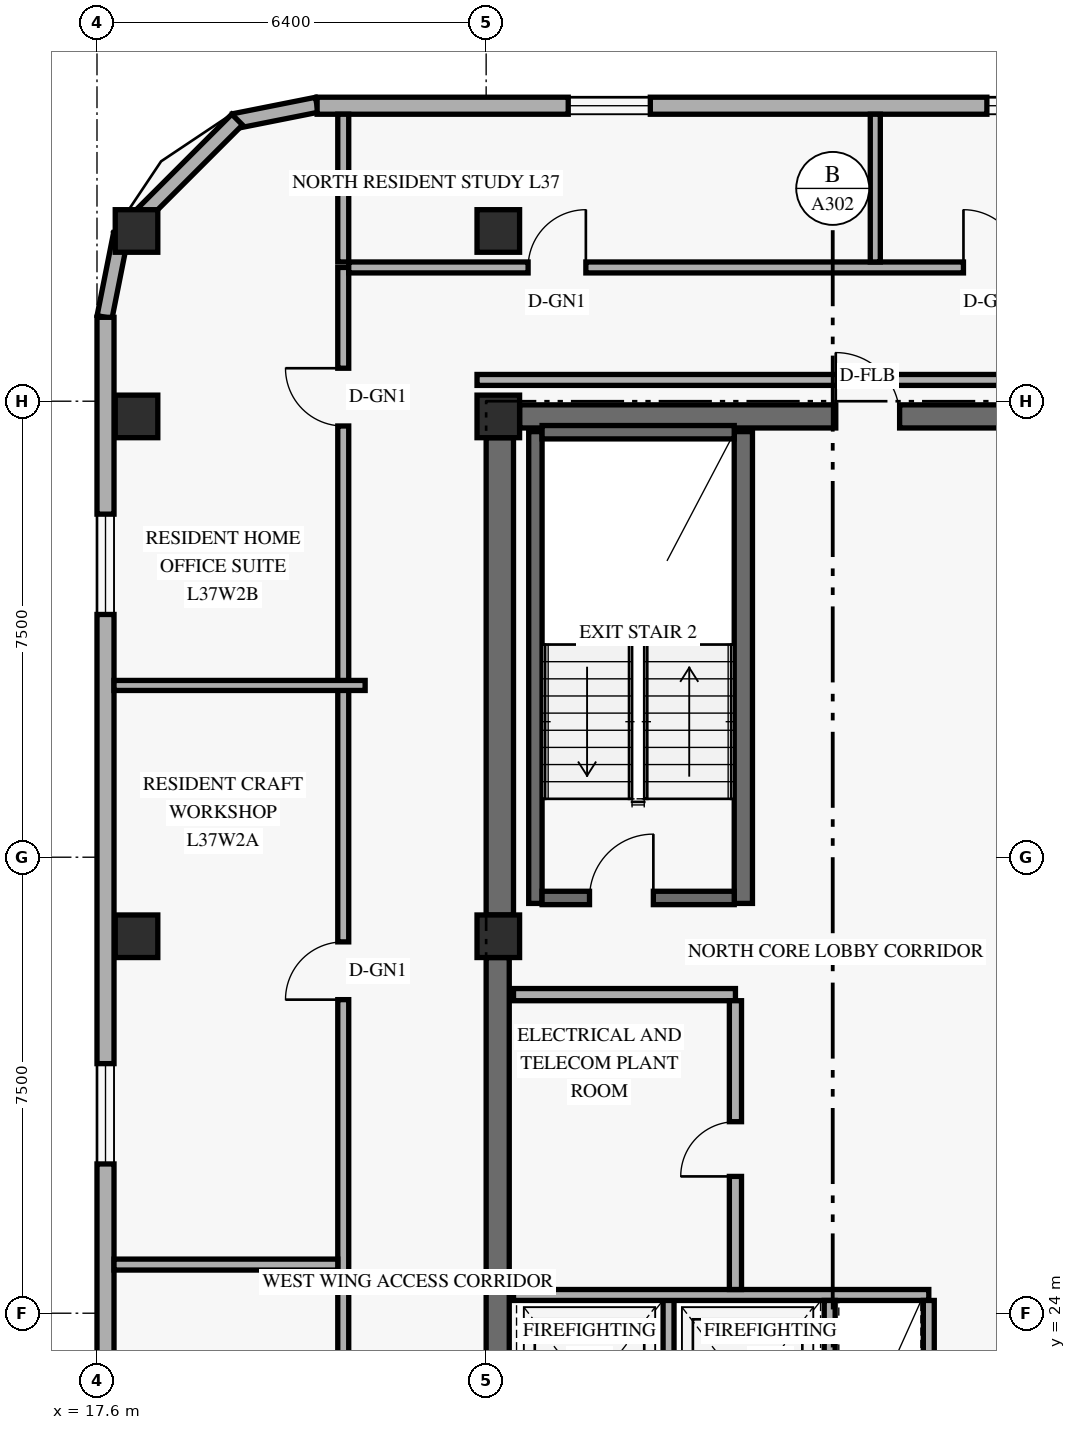
"""IFC4 building model, lengths in metres.
Left out: names, types, materials, properties, quantities, classifications, styles, units other than length and angle.
Written with IfcOpenShell. Run it as: python <this file> out.ifc"""

import sys

from ifc_helpers import new_model, si_unit, direction, frame, frame_2d, origin, origin_2d, place, context, subcontext, project, spatial, rectangle, extrude, element, fill, save


model = new_model("IFC4")
c1 = context("Model", 3, precision=1e-05, world=origin(), true_north=direction((0.0, 1.0)))
c2 = subcontext(c1, "Body", "Model", "MODEL_VIEW")
j1 = project(units=[si_unit("LENGTHUNIT", "METRE"), si_unit("PLANEANGLEUNIT", "RADIAN")], contexts=[c1])
p1 = place(None, origin())
s1 = spatial("IfcSite", under=j1, at=p1, CompositionType="ELEMENT")
p2 = place(p1, origin())
s2 = spatial("IfcBuilding", under=s1, at=p2, CompositionType="ELEMENT")
p3 = place(p2, frame((0.0, 0.0, 144.6)))
s3 = spatial("IfcBuildingStorey", under=s2, at=p3, CompositionType="ELEMENT", Elevation=144.6)
p4 = place(p3, frame((24.19, 17.9, 0.0), z_axis=(0.0, 0.0, 1.0), x_axis=(0.0, 1.0, 0.0)))
e1 = element("IfcWall", 1, at=p4, inside=s3, PredefinedType="SHEAR", context=c2, shape_type="SweptSolid", body=[
    extrude(rectangle(XDim=11.95, YDim=0.38, at=frame_2d((5.975, 0.0))), origin(), (0.0, 0.0, 1.0), 2.748),
])
p5 = place(p3, frame((24.225, 30.55, 0.0), z_axis=(0.0, 0.0, 1.0), x_axis=(0.0, 1.0, 0.0)))
e2 = element("IfcWall", 2, at=p5, inside=s3, PredefinedType="SHEAR", context=c2, shape_type="SweptSolid", body=[
    extrude(rectangle(XDim=7.85, YDim=0.45, at=frame_2d((3.925, 0.0))), origin(), (0.0, 0.0, 1.0), 2.748),
])
p6 = place(p3, frame((24.55, 38.75, 0.0), z_axis=(0.0, 0.0, 1.0), x_axis=(1.0, 0.0, 0.0)))
e3 = element("IfcWall", 3, at=p6, inside=s3, PredefinedType="SHEAR", context=c2, shape_type="SweptSolid", body=[
    extrude(rectangle(XDim=10.3, YDim=0.38, at=frame_2d((5.15, 0.0))), origin(), (0.0, 0.0, 1.0), 3.36),
])
p7 = place(p6, frame((5.2, 0.0, 0.0)))
e4 = element("IfcOpeningElement", 4, at=p7, cuts=e3, PredefinedType="OPENING", context=c2, shape_type="SweptSolid", body=[
    extrude(rectangle(XDim=1.05, YDim=2.15, at=frame_2d((0.525, 1.075))), frame((0.0, 0.2, 0.0), z_axis=(0.0, -1.0, 0.0), x_axis=(1.0, 0.0, 0.0)), (0.0, 0.0, 1.0), 0.4),
])
p8 = place(p3, frame((24.81, 30.74, 0.0), z_axis=(0.0, 0.0, 1.0), x_axis=(0.0, 1.0, 0.0)))
e5 = element("IfcWall", 5, at=p8, inside=s3, PredefinedType="SHEAR", context=c2, shape_type="SweptSolid", body=[
    extrude(rectangle(XDim=7.76, YDim=0.22, at=frame_2d((3.88, 0.0))), origin(), (0.0, 0.0, 1.0), 3.36),
])
p9 = place(p3, frame((28.23, 30.74, 0.0), z_axis=(0.0, 0.0, 1.0), x_axis=(0.0, 1.0, 0.0)))
e6 = element("IfcWall", 6, at=p9, inside=s3, PredefinedType="SHEAR", context=c2, shape_type="SweptSolid", body=[
    extrude(rectangle(XDim=7.76, YDim=0.3, at=frame_2d((3.88, 0.0))), origin(), (0.0, 0.0, 1.0), 3.36),
])
p10 = place(p3, frame((24.92, 30.83, 0.0), z_axis=(0.0, 0.0, 1.0), x_axis=(1.0, 0.0, 0.0)))
e7 = element("IfcWall", 7, at=p10, inside=s3, PredefinedType="SHEAR", context=c2, shape_type="SweptSolid", body=[
    extrude(rectangle(XDim=3.16, YDim=0.22, at=frame_2d((1.58, 0.0))), origin(), (0.0, 0.0, 1.0), 3.36),
])
p11 = place(p10, frame((0.78, 0.0, 0.0)))
e8 = element("IfcOpeningElement", 8, at=p11, cuts=e7, PredefinedType="OPENING", context=c2, shape_type="SweptSolid", body=[
    extrude(rectangle(XDim=1.05, YDim=2.15, at=frame_2d((0.525, 1.075))), frame((0.0, 0.12, 0.0), z_axis=(0.0, -1.0, 0.0), x_axis=(1.0, 0.0, 0.0)), (0.0, 0.0, 1.0), 0.24),
])
p12 = place(p3, frame((24.92, 38.49, 0.0), z_axis=(0.0, 0.0, 1.0), x_axis=(1.0, 0.0, 0.0)))
e9 = element("IfcWall", 9, at=p12, inside=s3, PredefinedType="SHEAR", context=c2, shape_type="SweptSolid", body=[
    extrude(rectangle(XDim=3.16, YDim=0.22, at=frame_2d((1.58, 0.0))), origin(), (0.0, 0.0, 1.0), 3.36),
])
for number, where, z_axis, x_axis in (
    (10, (18.25, 30.2, 0.0), (0.0, 0.0, 1.0), (1.0, 0.0, 0.0)),
    (11, (18.25, 38.75, 0.0), (0.0, 0.0, 1.0), (1.0, 0.0, 0.0)),
    (12, (18.25, 41.8, 0.0), (0.0, 0.0, 1.0), (1.0, 0.0, 0.0)),
    (13, (24.2, 30.2, 0.0), (0.0, 0.0, 1.0), (1.0, 0.0, 0.0)),
    (14, (24.2, 38.75, 0.0), (0.0, 0.0, 1.0), (1.0, 0.0, 0.0)),
    (15, (24.2, 41.8, 0.0), (0.0, 0.0, 1.0), (1.0, 0.0, 0.0)),
):
    element("IfcColumn", number, at=place(p3, frame(where, z_axis=z_axis, x_axis=x_axis)), inside=s3, PredefinedType="COLUMN", context=c2, shape_type="SweptSolid", body=[
        extrude(rectangle(XDim=0.7, YDim=0.7, at=origin_2d()), origin(), (0.0, 0.0, 1.0), 3.6),
    ])
p13 = place(p3, frame((21.217, 43.876, 0.0), z_axis=(0.0, 0.0, 1.0), x_axis=(-0.980809899341, -0.19496651342, 0.0)))
e16 = element("IfcWall", 16, at=p13, inside=s3, PredefinedType="SOLIDWALL", context=c2, shape_type="SweptSolid", body=[
    extrude(rectangle(XDim=1.389, YDim=0.25, at=frame_2d((0.694, 0.0))), origin(), (0.0, 0.0, 1.0), 3.36),
])
p14 = place(p3, frame((19.905, 43.632, 0.0), z_axis=(0.0, 0.0, 1.0), x_axis=(-0.707106781187, -0.707106781187, 0.0)))
e17 = element("IfcWall", 17, at=p14, inside=s3, PredefinedType="SOLIDWALL", context=c2, shape_type="SweptSolid", body=[
    extrude(rectangle(XDim=2.739, YDim=0.25, at=frame_2d((1.37, 0.0))), origin(), (0.0, 0.0, 1.0), 3.36),
])
p15 = place(p3, frame((17.995, 41.746, 0.0), z_axis=(0.0, 0.0, 1.0), x_axis=(-0.195135625965, -0.9807762678, 0.0)))
e18 = element("IfcWall", 18, at=p15, inside=s3, PredefinedType="SOLIDWALL", context=c2, shape_type="SweptSolid", body=[
    extrude(rectangle(XDim=1.389, YDim=0.25, at=frame_2d((0.694, 0.0))), origin(), (0.0, 0.0, 1.0), 3.36),
])
p16 = place(p3, frame((54.98, 43.86, 0.0), z_axis=(0.0, 0.0, 1.0), x_axis=(-1.0, 0.0, 0.0)))
e19 = element("IfcWall", 19, at=p16, inside=s3, PredefinedType="SOLIDWALL", context=c2, shape_type="SweptSolid", body=[
    extrude(rectangle(XDim=33.76, YDim=0.28, at=frame_2d((16.88, 0.0))), origin(), (0.0, 0.0, 1.0), 3.36),
])
p17 = place(p16, frame((28.28, 0.0, 0.85)))
e20 = element("IfcOpeningElement", 20, at=p17, cuts=e19, PredefinedType="OPENING", context=c2, shape_type="SweptSolid", body=[
    extrude(rectangle(XDim=1.35, YDim=1.55, at=frame_2d((0.675, 0.775))), frame((0.0, 0.15, 0.0), z_axis=(0.0, -1.0, 0.0), x_axis=(1.0, 0.0, 0.0)), (0.0, 0.0, 1.0), 0.3),
])
p18 = place(p16, frame((21.395, 0.0, 0.85)))
e21 = element("IfcOpeningElement", 21, at=p18, cuts=e19, PredefinedType="OPENING", context=c2, shape_type="SweptSolid", body=[
    extrude(rectangle(XDim=1.35, YDim=1.55, at=frame_2d((0.675, 0.775))), frame((0.0, 0.15, 0.0), z_axis=(0.0, -1.0, 0.0), x_axis=(1.0, 0.0, 0.0)), (0.0, 0.0, 1.0), 0.3),
])
p19 = place(p16, frame((15.09, 0.0, 0.85)))
e22 = element("IfcOpeningElement", 22, at=p19, cuts=e19, PredefinedType="OPENING", context=c2, shape_type="SweptSolid", body=[
    extrude(rectangle(XDim=1.35, YDim=1.55, at=frame_2d((0.675, 0.775))), frame((0.0, 0.15, 0.0), z_axis=(0.0, -1.0, 0.0), x_axis=(1.0, 0.0, 0.0)), (0.0, 0.0, 1.0), 0.3),
])
p20 = place(p16, frame((8.8, 0.0, 0.85)))
e23 = element("IfcOpeningElement", 23, at=p20, cuts=e19, PredefinedType="OPENING", context=c2, shape_type="SweptSolid", body=[
    extrude(rectangle(XDim=1.35, YDim=1.55, at=frame_2d((0.675, 0.775))), frame((0.0, 0.15, 0.0), z_axis=(0.0, -1.0, 0.0), x_axis=(1.0, 0.0, 0.0)), (0.0, 0.0, 1.0), 0.3),
])
p21 = place(p16, frame((5.48, 0.0, 0.85)))
e24 = element("IfcOpeningElement", 24, at=p21, cuts=e19, PredefinedType="OPENING", context=c2, shape_type="SweptSolid", body=[
    extrude(rectangle(XDim=1.2, YDim=1.5, at=frame_2d((0.6, 0.75))), frame((0.0, 0.15, 0.0), z_axis=(0.0, -1.0, 0.0), x_axis=(1.0, 0.0, 0.0)), (0.0, 0.0, 1.0), 0.3),
])
p22 = place(p16, frame((1.915, 0.0, 0.85)))
e25 = element("IfcOpeningElement", 25, at=p22, cuts=e19, PredefinedType="OPENING", context=c2, shape_type="SweptSolid", body=[
    extrude(rectangle(XDim=1.35, YDim=1.55, at=frame_2d((0.675, 0.775))), frame((0.0, 0.15, 0.0), z_axis=(0.0, -1.0, 0.0), x_axis=(1.0, 0.0, 0.0)), (0.0, 0.0, 1.0), 0.3),
])
p23 = place(p3, frame((17.74, 40.38, 0.0), z_axis=(0.0, 0.0, 1.0), x_axis=(0.0, -1.0, 0.0)))
e26 = element("IfcWall", 26, at=p23, inside=s3, PredefinedType="SOLIDWALL", context=c2, shape_type="SweptSolid", body=[
    extrude(rectangle(XDim=32.76, YDim=0.28, at=frame_2d((16.38, 0.0))), origin(), (0.0, 0.0, 1.0), 3.36),
])
p24 = place(p23, frame((27.698, 0.0, 0.85)))
e27 = element("IfcOpeningElement", 27, at=p24, cuts=e26, PredefinedType="OPENING", context=c2, shape_type="SweptSolid", body=[
    extrude(rectangle(XDim=1.65, YDim=1.6, at=frame_2d((0.825, 0.8))), frame((0.0, 0.15, 0.0), z_axis=(0.0, -1.0, 0.0), x_axis=(1.0, 0.0, 0.0)), (0.0, 0.0, 1.0), 0.3),
])
p25 = place(p23, frame((18.16, 0.0, 0.85)))
e28 = element("IfcOpeningElement", 28, at=p25, cuts=e26, PredefinedType="OPENING", context=c2, shape_type="SweptSolid", body=[
    extrude(rectangle(XDim=1.65, YDim=1.6, at=frame_2d((0.825, 0.8))), frame((0.0, 0.15, 0.0), z_axis=(0.0, -1.0, 0.0), x_axis=(1.0, 0.0, 0.0)), (0.0, 0.0, 1.0), 0.3),
])
p26 = place(p23, frame((12.275, 0.0, 0.85)))
e29 = element("IfcOpeningElement", 29, at=p26, cuts=e26, PredefinedType="OPENING", context=c2, shape_type="SweptSolid", body=[
    extrude(rectangle(XDim=1.65, YDim=1.6, at=frame_2d((0.825, 0.8))), frame((0.0, 0.15, 0.0), z_axis=(0.0, -1.0, 0.0), x_axis=(1.0, 0.0, 0.0)), (0.0, 0.0, 1.0), 0.3),
])
p27 = place(p23, frame((3.238, 0.0, 0.85)))
e30 = element("IfcOpeningElement", 30, at=p27, cuts=e26, PredefinedType="OPENING", context=c2, shape_type="SweptSolid", body=[
    extrude(rectangle(XDim=1.65, YDim=1.6, at=frame_2d((0.825, 0.8))), frame((0.0, 0.15, 0.0), z_axis=(0.0, -1.0, 0.0), x_axis=(1.0, 0.0, 0.0)), (0.0, 0.0, 1.0), 0.3),
])
p28 = place(p3, frame((27.0, 21.19, 0.0), z_axis=(0.0, 0.0, 1.0), x_axis=(0.0, 1.0, 0.0)))
e31 = element("IfcWall", 31, at=p28, inside=s3, PredefinedType="STANDARD", context=c2, shape_type="SweptSolid", body=[
    extrude(rectangle(XDim=3.11, YDim=0.18, at=frame_2d((1.555, 0.0))), origin(), (0.0, 0.0, 1.0), 3.36),
])
p29 = place(p3, frame((24.45, 24.3, 0.0), z_axis=(0.0, 0.0, 1.0), x_axis=(1.0, 0.0, 0.0)))
e32 = element("IfcWall", 32, at=p29, inside=s3, PredefinedType="STANDARD", context=c2, shape_type="SweptSolid", body=[
    extrude(rectangle(XDim=6.83, YDim=0.18, at=frame_2d((3.415, 0.0))), origin(), (0.0, 0.0, 1.0), 3.36),
])
for number, where, z_axis, x_axis in (
    (33, (29.65, 21.19, 0.0), (0.0, 0.0, 1.0), (0.0, 1.0, 0.0)),
    (34, (31.28, 21.19, 0.0), (0.0, 0.0, 1.0), (0.0, 1.0, 0.0)),
):
    element("IfcWall", number, at=place(p3, frame(where, z_axis=z_axis, x_axis=x_axis)), inside=s3, PredefinedType="STANDARD", context=c2, shape_type="SweptSolid", body=[
        extrude(rectangle(XDim=3.02, YDim=0.18, at=frame_2d((1.51, 0.0))), origin(), (0.0, 0.0, 1.0), 3.36),
    ])
p30 = place(p3, frame((24.45, 29.24, 0.0), z_axis=(0.0, 0.0, 1.0), x_axis=(1.0, 0.0, 0.0)))
e35 = element("IfcWall", 35, at=p30, inside=s3, PredefinedType="STANDARD", context=c2, shape_type="SweptSolid", body=[
    extrude(rectangle(XDim=3.65, YDim=0.2, at=frame_2d((1.825, 0.0))), origin(), (0.0, 0.0, 1.0), 3.36),
])
p31 = place(p3, frame((28.1, 24.39, 0.0), z_axis=(0.0, 0.0, 1.0), x_axis=(0.0, 1.0, 0.0)))
e36 = element("IfcWall", 36, at=p31, inside=s3, PredefinedType="STANDARD", context=c2, shape_type="SweptSolid", body=[
    extrude(rectangle(XDim=4.75, YDim=0.2, at=frame_2d((2.375, 0.0))), origin(), (0.0, 0.0, 1.0), 3.36),
])
p32 = place(p31, frame((1.86, 0.0, 0.0)))
e37 = element("IfcOpeningElement", 37, at=p32, cuts=e36, PredefinedType="OPENING", context=c2, shape_type="SweptSolid", body=[
    extrude(rectangle(XDim=0.9, YDim=2.1, at=frame_2d((0.45, 1.05))), frame((0.0, 0.11, 0.0), z_axis=(0.0, -1.0, 0.0), x_axis=(1.0, 0.0, 0.0)), (0.0, 0.0, 1.0), 0.22),
])
p33 = place(p3, frame((21.65, 6.8, 0.0), z_axis=(0.0, 0.0, 1.0), x_axis=(0.0, 1.0, 0.0)))
e38 = element("IfcWall", 38, at=p33, inside=s3, PredefinedType="STANDARD", context=c2, shape_type="SweptSolid", body=[
    extrude(rectangle(XDim=34.4, YDim=0.18, at=frame_2d((17.2, 0.0))), origin(), (0.0, 0.0, 1.0), 2.73),
])
p34 = place(p33, frame((1.883, 0.0, 0.0)))
e39 = element("IfcOpeningElement", 39, at=p34, cuts=e38, PredefinedType="OPENING", context=c2, shape_type="SweptSolid", body=[
    extrude(rectangle(XDim=0.95, YDim=2.15, at=frame_2d((0.475, 1.075))), frame((0.0, 0.1, 0.0), z_axis=(0.0, -1.0, 0.0), x_axis=(1.0, 0.0, 0.0)), (0.0, 0.0, 1.0), 0.2),
])
p35 = place(p33, frame((12.117, 0.0, 0.0)))
e40 = element("IfcOpeningElement", 40, at=p35, cuts=e38, PredefinedType="OPENING", context=c2, shape_type="SweptSolid", body=[
    extrude(rectangle(XDim=0.95, YDim=2.15, at=frame_2d((0.475, 1.075))), frame((0.0, 0.1, 0.0), z_axis=(0.0, -1.0, 0.0), x_axis=(1.0, 0.0, 0.0)), (0.0, 0.0, 1.0), 0.2),
])
p36 = place(p33, frame((22.357, 0.0, 0.0)))
e41 = element("IfcOpeningElement", 41, at=p36, cuts=e38, PredefinedType="OPENING", context=c2, shape_type="SweptSolid", body=[
    extrude(rectangle(XDim=0.95, YDim=2.15, at=frame_2d((0.475, 1.075))), frame((0.0, 0.1, 0.0), z_axis=(0.0, -1.0, 0.0), x_axis=(1.0, 0.0, 0.0)), (0.0, 0.0, 1.0), 0.2),
])
p37 = place(p33, frame((31.792, 0.0, 0.0)))
e42 = element("IfcOpeningElement", 42, at=p37, cuts=e38, PredefinedType="OPENING", context=c2, shape_type="SweptSolid", body=[
    extrude(rectangle(XDim=0.95, YDim=2.15, at=frame_2d((0.475, 1.075))), frame((0.0, 0.1, 0.0), z_axis=(0.0, -1.0, 0.0), x_axis=(1.0, 0.0, 0.0)), (0.0, 0.0, 1.0), 0.2),
])
p38 = place(p3, frame((21.74, 41.2, 0.0), z_axis=(0.0, 0.0, 1.0), x_axis=(1.0, 0.0, 0.0)))
e43 = element("IfcWall", 43, at=p38, inside=s3, PredefinedType="STANDARD", context=c2, shape_type="SweptSolid", body=[
    extrude(rectangle(XDim=13.68, YDim=0.18, at=frame_2d((6.84, 0.0))), origin(), (0.0, 0.0, 1.0), 2.73),
])
p39 = place(p38, frame((2.95, 0.0, 0.0)))
e44 = element("IfcOpeningElement", 44, at=p39, cuts=e43, PredefinedType="OPENING", context=c2, shape_type="SweptSolid", body=[
    extrude(rectangle(XDim=0.95, YDim=2.15, at=frame_2d((0.475, 1.075))), frame((0.0, 0.1, 0.0), z_axis=(0.0, -1.0, 0.0), x_axis=(1.0, 0.0, 0.0)), (0.0, 0.0, 1.0), 0.2),
])
p40 = place(p38, frame((10.11, 0.0, 0.0)))
e45 = element("IfcOpeningElement", 45, at=p40, cuts=e43, PredefinedType="OPENING", context=c2, shape_type="SweptSolid", body=[
    extrude(rectangle(XDim=0.95, YDim=2.15, at=frame_2d((0.475, 1.075))), frame((0.0, 0.1, 0.0), z_axis=(0.0, -1.0, 0.0), x_axis=(1.0, 0.0, 0.0)), (0.0, 0.0, 1.0), 0.2),
])
p41 = place(p3, frame((23.85, 39.35, 0.0), z_axis=(0.0, 0.0, 1.0), x_axis=(1.0, 0.0, 0.0)))
e46 = element("IfcWall", 46, at=p41, inside=s3, PredefinedType="STANDARD", context=c2, shape_type="SweptSolid", body=[
    extrude(rectangle(XDim=11.57, YDim=0.18, at=frame_2d((5.785, 0.0))), origin(), (0.0, 0.0, 1.0), 2.73),
])
p42 = place(p3, frame((21.65, 41.29, 0.0), z_axis=(0.0, 0.0, 1.0), x_axis=(0.0, 1.0, 0.0)))
e47 = element("IfcWall", 47, at=p42, inside=s3, PredefinedType="PARTITIONING", context=c2, shape_type="SweptSolid", body=[
    extrude(rectangle(XDim=2.43, YDim=0.18, at=frame_2d((1.215, 0.0))), origin(), (0.0, 0.0, 1.0), 2.879),
])
p43 = place(p3, frame((17.88, 24.8, 0.0), z_axis=(0.0, 0.0, 1.0), x_axis=(1.0, 0.0, 0.0)))
e48 = element("IfcWall", 48, at=p43, inside=s3, PredefinedType="PARTITIONING", context=c2, shape_type="SweptSolid", body=[
    extrude(rectangle(XDim=3.68, YDim=0.18, at=frame_2d((1.84, 0.0))), origin(), (0.0, 0.0, 1.0), 2.879),
])
p44 = place(p3, frame((17.88, 34.325, 0.0), z_axis=(0.0, 0.0, 1.0), x_axis=(1.0, 0.0, 0.0)))
e49 = element("IfcWall", 49, at=p44, inside=s3, PredefinedType="PARTITIONING", context=c2, shape_type="SweptSolid", body=[
    extrude(rectangle(XDim=4.13, YDim=0.165, at=frame_2d((2.065, 0.0))), origin(), (0.0, 0.0, 1.0), 2.879),
])
p45 = place(p3, frame((30.4, 41.29, 0.0), z_axis=(0.0, 0.0, 1.0), x_axis=(0.0, 1.0, 0.0)))
e50 = element("IfcWall", 50, at=p45, inside=s3, PredefinedType="PARTITIONING", context=c2, shape_type="SweptSolid", body=[
    extrude(rectangle(XDim=2.43, YDim=0.165, at=frame_2d((1.215, 0.0))), origin(), (0.0, 0.0, 1.0), 2.879),
])
p46 = place(p17, origin())
e51 = element("IfcWindow", 51, at=p46, inside=s3, PartitioningType="SINGLE_PANEL", PredefinedType="WINDOW", context=c2, shape_type="SweptSolid", body=[
    extrude(rectangle(XDim=1.35, YDim=1.55, at=frame_2d((0.675, 0.775))), frame((0.0, 0.03, 0.0), z_axis=(0.0, -1.0, 0.0), x_axis=(1.0, 0.0, 0.0)), (0.0, 0.0, 1.0), 0.06),
])
fill(e20, e51)
p47 = place(p18, origin())
e52 = element("IfcWindow", 52, at=p47, inside=s3, PartitioningType="SINGLE_PANEL", PredefinedType="WINDOW", context=c2, shape_type="SweptSolid", body=[
    extrude(rectangle(XDim=1.35, YDim=1.55, at=frame_2d((0.675, 0.775))), frame((0.0, 0.03, 0.0), z_axis=(0.0, -1.0, 0.0), x_axis=(1.0, 0.0, 0.0)), (0.0, 0.0, 1.0), 0.06),
])
fill(e21, e52)
p48 = place(p26, origin())
e53 = element("IfcWindow", 53, at=p48, inside=s3, PartitioningType="SINGLE_PANEL", PredefinedType="WINDOW", context=c2, shape_type="SweptSolid", body=[
    extrude(rectangle(XDim=1.65, YDim=1.6, at=frame_2d((0.825, 0.8))), frame((0.0, 0.03, 0.0), z_axis=(0.0, -1.0, 0.0), x_axis=(1.0, 0.0, 0.0)), (0.0, 0.0, 1.0), 0.06),
])
fill(e29, e53)
p49 = place(p27, origin())
e54 = element("IfcWindow", 54, at=p49, inside=s3, PartitioningType="SINGLE_PANEL", PredefinedType="WINDOW", context=c2, shape_type="SweptSolid", body=[
    extrude(rectangle(XDim=1.65, YDim=1.6, at=frame_2d((0.825, 0.8))), frame((0.0, 0.03, 0.0), z_axis=(0.0, -1.0, 0.0), x_axis=(1.0, 0.0, 0.0)), (0.0, 0.0, 1.0), 0.06),
])
fill(e30, e54)
p50 = place(p11, origin())
e55 = element("IfcDoor", 55, at=p50, inside=s3, OperationType="SINGLE_SWING_RIGHT", PredefinedType="DOOR", context=c2, shape_type="SweptSolid", body=[
    extrude(rectangle(XDim=1.05, YDim=2.15, at=frame_2d((0.525, 1.075))), frame((0.0, 0.025, 0.0), z_axis=(0.0, -1.0, 0.0), x_axis=(1.0, 0.0, 0.0)), (0.0, 0.0, 1.0), 0.05),
])
fill(e8, e55)
p51 = place(p32, origin())
e56 = element("IfcDoor", 56, at=p51, inside=s3, OperationType="SINGLE_SWING_LEFT", PredefinedType="DOOR", context=c2, shape_type="SweptSolid", body=[
    extrude(rectangle(XDim=0.9, YDim=2.1, at=frame_2d((0.45, 1.05))), frame((0.0, 0.025, 0.0), z_axis=(0.0, -1.0, 0.0), x_axis=(1.0, 0.0, 0.0)), (0.0, 0.0, 1.0), 0.05),
])
fill(e37, e56)
p52 = place(p7, frame((1.05, 0.0, 0.0), z_axis=(0.0, 0.0, 1.0), x_axis=(-1.0, 0.0, 0.0)))
e57 = element("IfcDoor", 57, at=p52, inside=s3, OperationType="SINGLE_SWING_RIGHT", PredefinedType="DOOR", context=c2, shape_type="SweptSolid", body=[
    extrude(rectangle(XDim=1.05, YDim=2.15, at=frame_2d((0.525, 1.075))), frame((0.0, 0.025, 0.0), z_axis=(0.0, -1.0, 0.0), x_axis=(1.0, 0.0, 0.0)), (0.0, 0.0, 1.0), 0.05),
])
fill(e4, e57)
p53 = place(p36, origin())
e58 = element("IfcDoor", 58, at=p53, inside=s3, OperationType="SINGLE_SWING_LEFT", PredefinedType="DOOR", context=c2, shape_type="SweptSolid", body=[
    extrude(rectangle(XDim=0.95, YDim=2.15, at=frame_2d((0.475, 1.075))), frame((0.0, 0.025, 0.0), z_axis=(0.0, -1.0, 0.0), x_axis=(1.0, 0.0, 0.0)), (0.0, 0.0, 1.0), 0.05),
])
fill(e41, e58)
p54 = place(p37, origin())
e59 = element("IfcDoor", 59, at=p54, inside=s3, OperationType="SINGLE_SWING_RIGHT", PredefinedType="DOOR", context=c2, shape_type="SweptSolid", body=[
    extrude(rectangle(XDim=0.95, YDim=2.15, at=frame_2d((0.475, 1.075))), frame((0.0, 0.025, 0.0), z_axis=(0.0, -1.0, 0.0), x_axis=(1.0, 0.0, 0.0)), (0.0, 0.0, 1.0), 0.05),
])
fill(e42, e59)
p55 = place(p39, origin())
e60 = element("IfcDoor", 60, at=p55, inside=s3, OperationType="SINGLE_SWING_RIGHT", PredefinedType="DOOR", context=c2, shape_type="SweptSolid", body=[
    extrude(rectangle(XDim=0.95, YDim=2.15, at=frame_2d((0.475, 1.075))), frame((0.0, 0.025, 0.0), z_axis=(0.0, -1.0, 0.0), x_axis=(1.0, 0.0, 0.0)), (0.0, 0.0, 1.0), 0.05),
])
fill(e44, e60)
p56 = place(p40, origin())
e61 = element("IfcDoor", 61, at=p56, inside=s3, OperationType="SINGLE_SWING_LEFT", PredefinedType="DOOR", context=c2, shape_type="SweptSolid", body=[
    extrude(rectangle(XDim=0.95, YDim=2.15, at=frame_2d((0.475, 1.075))), frame((0.0, 0.025, 0.0), z_axis=(0.0, -1.0, 0.0), x_axis=(1.0, 0.0, 0.0)), (0.0, 0.0, 1.0), 0.05),
])
fill(e45, e61)
save(model, sys.argv[1])
